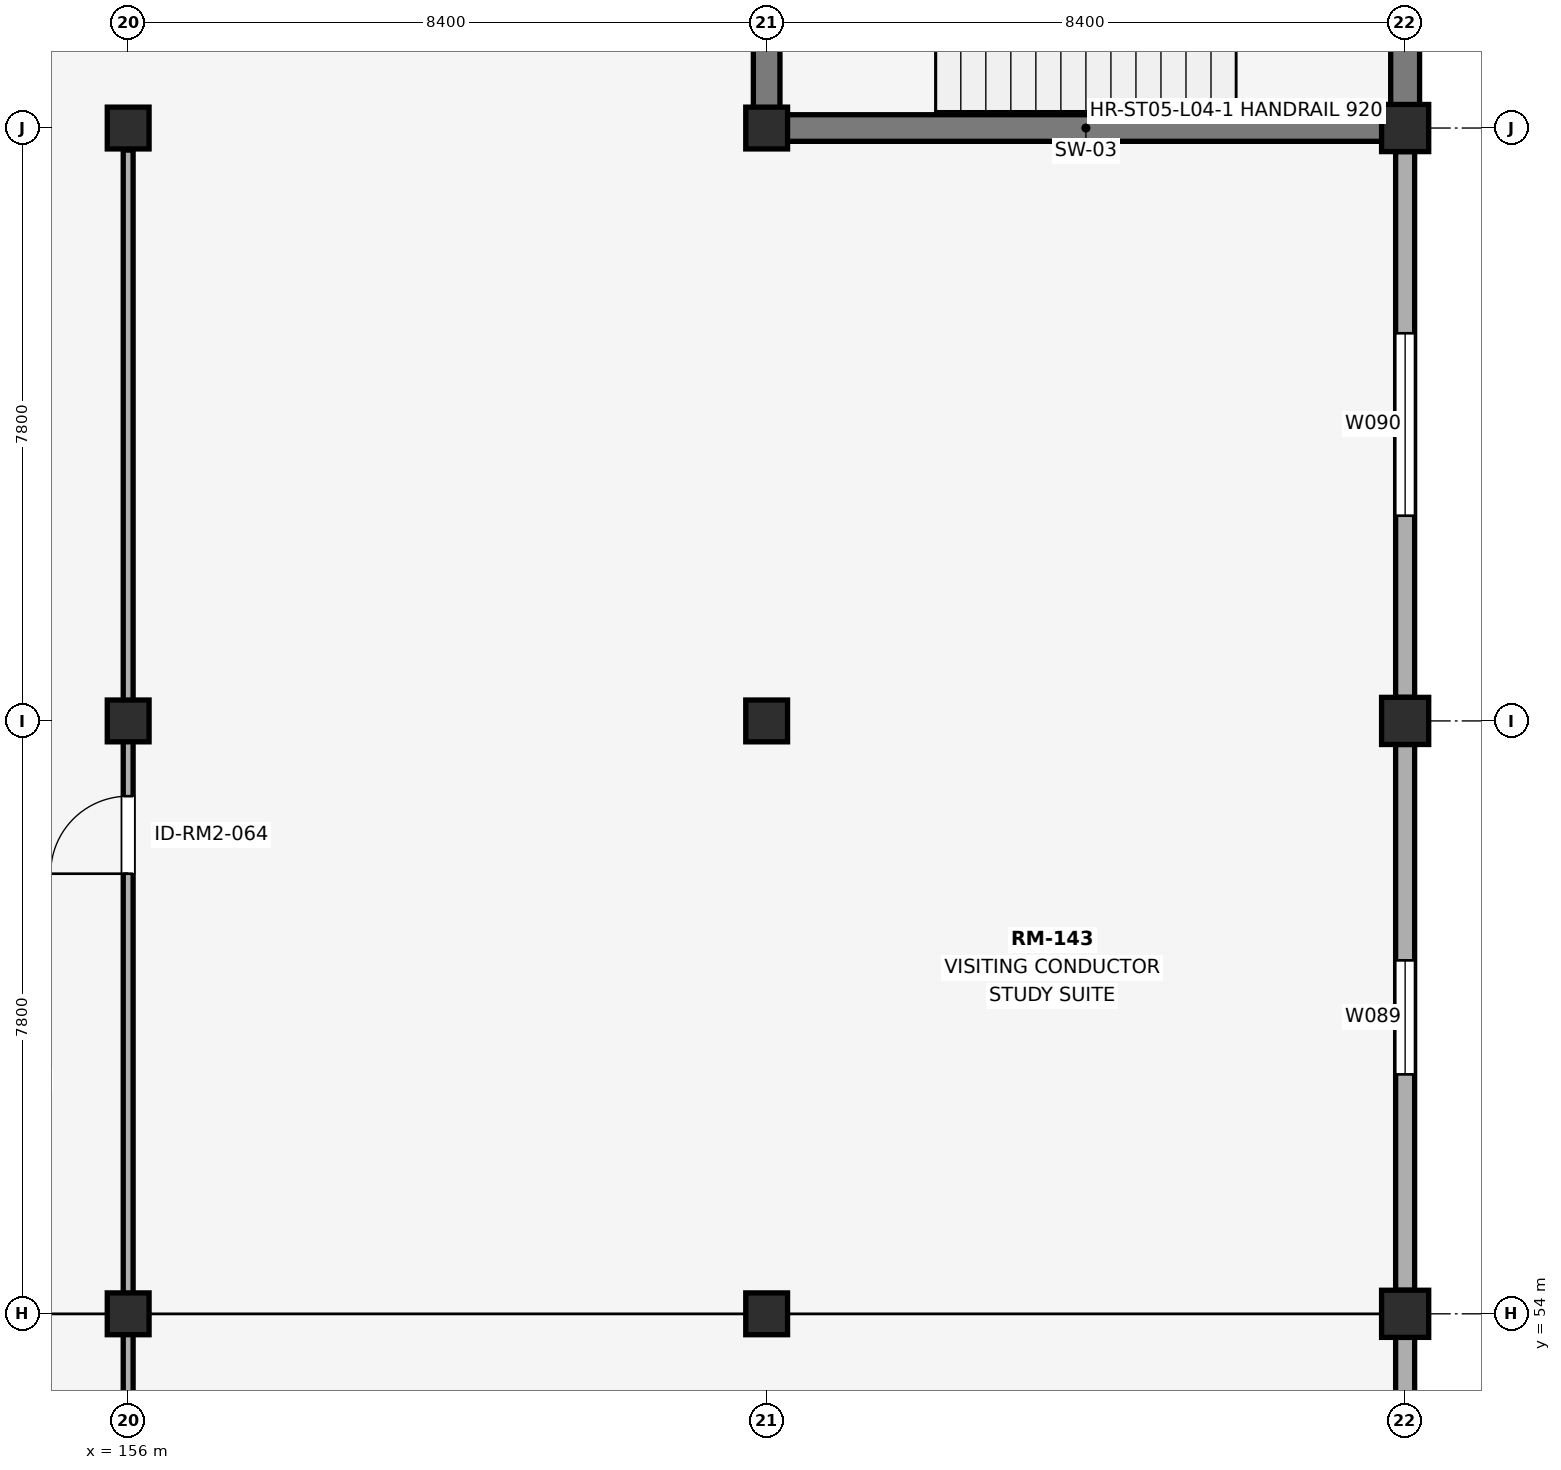
"""IFC4 building model, lengths in metres.
Left out: names, types, materials, properties, quantities, classifications, styles, units other than length and angle.
Written with IfcOpenShell. Run it as: python <this file> out.ifc"""

import sys

from ifc_helpers import new_model, si_unit, direction, frame, frame_2d, origin, origin_2d, place, context, subcontext, project, spatial, rectangle, extrude, element, fill, save


model = new_model("IFC4")
c1 = context("Model", 3, precision=1e-05, world=origin(), true_north=direction((0.0, 1.0)))
c2 = subcontext(c1, "Body", "Model", "MODEL_VIEW")
j1 = project(units=[si_unit("LENGTHUNIT", "METRE"), si_unit("PLANEANGLEUNIT", "RADIAN")], contexts=[c1])
p1 = place(None, origin())
s1 = spatial("IfcSite", under=j1, at=p1, CompositionType="ELEMENT")
p2 = place(p1, origin())
s2 = spatial("IfcBuilding", under=s1, at=p2, CompositionType="ELEMENT")
p3 = place(p2, frame((0.0, 0.0, 19.5)))
s3 = spatial("IfcBuildingStorey", under=s2, at=p3, CompositionType="ELEMENT", Elevation=19.5)
for number, where, z_axis, x_axis in (
    (1, (156.0, 54.0, 0.0), (0.0, 0.0, 1.0), (1.0, 0.0, 0.0)),
    (2, (156.0, 61.8, 0.0), (0.0, 0.0, 1.0), (1.0, 0.0, 0.0)),
    (3, (156.0, 69.6, 0.0), (0.0, 0.0, 1.0), (1.0, 0.0, 0.0)),
    (4, (164.4, 54.0, 0.0), (0.0, 0.0, 1.0), (1.0, 0.0, 0.0)),
    (5, (164.4, 61.8, 0.0), (0.0, 0.0, 1.0), (1.0, 0.0, 0.0)),
    (6, (164.4, 69.6, 0.0), (0.0, 0.0, 1.0), (1.0, 0.0, 0.0)),
):
    element("IfcColumn", number, at=place(p3, frame(where, z_axis=z_axis, x_axis=x_axis)), inside=s3, PredefinedType="COLUMN", context=c2, shape_type="SweptSolid", body=[
        extrude(rectangle(XDim=0.55, YDim=0.55, at=origin_2d()), origin(), (0.0, 0.0, 1.0), 4.5),
    ])
for number, where, z_axis, x_axis in (
    (7, (172.8, 54.0, 0.0), (0.0, 0.0, 1.0), (1.0, 0.0, 0.0)),
    (8, (172.8, 61.8, 0.0), (0.0, 0.0, 1.0), (1.0, 0.0, 0.0)),
    (9, (172.8, 69.6, 0.0), (0.0, 0.0, 1.0), (1.0, 0.0, 0.0)),
):
    element("IfcColumn", number, at=place(p3, frame(where, z_axis=z_axis, x_axis=x_axis)), inside=s3, PredefinedType="COLUMN", context=c2, shape_type="SweptSolid", body=[
        extrude(rectangle(XDim=0.62, YDim=0.62, at=origin_2d()), origin(), (0.0, 0.0, 1.0), 4.5),
    ])
p4 = place(p3, frame((164.225, 69.6, 0.0), z_axis=(0.0, 0.0, 1.0), x_axis=(1.0, 0.0, 0.0)))
e10 = element("IfcWall", 10, at=p4, inside=s3, PredefinedType="SHEAR", context=c2, shape_type="SweptSolid", body=[
    extrude(rectangle(XDim=8.75, YDim=0.35, at=frame_2d((4.375, 0.0))), origin(), (0.0, 0.0, 1.0), 4.5),
])
p5 = place(p3, frame((164.4, 69.775, 0.0), z_axis=(0.0, 0.0, 1.0), x_axis=(0.0, 1.0, 0.0)))
e11 = element("IfcWall", 11, at=p5, inside=s3, PredefinedType="SHEAR", context=c2, shape_type="SweptSolid", body=[
    extrude(rectangle(XDim=7.45, YDim=0.35, at=frame_2d((3.725, 0.0))), origin(), (0.0, 0.0, 1.0), 4.5),
])
p6 = place(p5, frame((2.1, 0.0, 0.0)))
e12 = element("IfcOpeningElement", 12, at=p6, cuts=e11, PredefinedType="OPENING", context=c2, shape_type="SweptSolid", body=[
    extrude(rectangle(XDim=1.1, YDim=2.2, at=frame_2d((0.55, 1.1))), frame((0.0, 0.185, 0.0), z_axis=(0.0, -1.0, 0.0), x_axis=(1.0, 0.0, 0.0)), (0.0, 0.0, 1.0), 0.37),
])
p7 = place(p3, frame((172.8, 69.775, 0.0), z_axis=(0.0, 0.0, 1.0), x_axis=(0.0, 1.0, 0.0)))
e13 = element("IfcWall", 13, at=p7, inside=s3, PredefinedType="SHEAR", context=c2, shape_type="SweptSolid", body=[
    extrude(rectangle(XDim=7.45, YDim=0.38, at=frame_2d((3.725, 0.0))), origin(), (0.0, 0.0, 1.0), 4.5),
])
p8 = place(p3, frame((172.8, 46.51, 0.0), z_axis=(0.0, 0.0, 1.0), x_axis=(0.0, 1.0, 0.0)))
e14 = element("IfcWall", 14, at=p8, inside=s3, PredefinedType="SOLIDWALL", context=c2, shape_type="SweptSolid", body=[
    extrude(rectangle(XDim=7.18, YDim=0.25, at=frame_2d((3.59, 0.0))), origin(), (0.0, 0.0, 1.0), 3.52),
])
p9 = place(p8, frame((2.99, 0.0, 0.9)))
e15 = element("IfcOpeningElement", 15, at=p9, cuts=e14, PredefinedType="OPENING", context=c2, shape_type="SweptSolid", body=[
    extrude(rectangle(XDim=1.2, YDim=1.65, at=frame_2d((0.6, 0.825))), frame((0.0, 0.135, 0.0), z_axis=(0.0, -1.0, 0.0), x_axis=(1.0, 0.0, 0.0)), (0.0, 0.0, 1.0), 0.27),
])
p10 = place(p3, frame((172.8, 54.31, 0.0), z_axis=(0.0, 0.0, 1.0), x_axis=(0.0, 1.0, 0.0)))
e16 = element("IfcWall", 16, at=p10, inside=s3, PredefinedType="SOLIDWALL", context=c2, shape_type="SweptSolid", body=[
    extrude(rectangle(XDim=7.18, YDim=0.25, at=frame_2d((3.59, 0.0))), origin(), (0.0, 0.0, 1.0), 3.52),
])
p11 = place(p10, frame((2.84, 0.0, 0.9)))
e17 = element("IfcOpeningElement", 17, at=p11, cuts=e16, PredefinedType="OPENING", context=c2, shape_type="SweptSolid", body=[
    extrude(rectangle(XDim=1.5, YDim=2.1, at=frame_2d((0.75, 1.05))), frame((0.0, 0.135, 0.0), z_axis=(0.0, -1.0, 0.0), x_axis=(1.0, 0.0, 0.0)), (0.0, 0.0, 1.0), 0.27),
])
p12 = place(p3, frame((172.8, 62.11, 0.0), z_axis=(0.0, 0.0, 1.0), x_axis=(0.0, 1.0, 0.0)))
e18 = element("IfcWall", 18, at=p12, inside=s3, PredefinedType="SOLIDWALL", context=c2, shape_type="SweptSolid", body=[
    extrude(rectangle(XDim=7.18, YDim=0.25, at=frame_2d((3.59, 0.0))), origin(), (0.0, 0.0, 1.0), 3.52),
])
p13 = place(p12, frame((2.39, 0.0, 0.9)))
e19 = element("IfcOpeningElement", 19, at=p13, cuts=e18, PredefinedType="OPENING", context=c2, shape_type="SweptSolid", body=[
    extrude(rectangle(XDim=2.4, YDim=2.1, at=frame_2d((1.2, 1.05))), frame((0.0, 0.135, 0.0), z_axis=(0.0, -1.0, 0.0), x_axis=(1.0, 0.0, 0.0)), (0.0, 0.0, 1.0), 0.27),
])
p14 = place(p3, frame((156.0, 30.29, 0.0), z_axis=(0.0, 0.0, 1.0), x_axis=(0.0, 1.0, 0.0)))
e20 = element("IfcWall", 20, at=p14, inside=s3, PredefinedType="PARTITIONING", context=c2, shape_type="SweptSolid", body=[
    extrude(rectangle(XDim=39.02, YDim=0.13, at=frame_2d((19.51, 0.0))), origin(), (0.0, 0.0, 1.0), 3.42),
])
p15 = place(p14, frame((2.4, 0.0, 0.0)))
e21 = element("IfcOpeningElement", 21, at=p15, cuts=e20, PredefinedType="OPENING", context=c2, shape_type="SweptSolid", body=[
    extrude(rectangle(XDim=0.92, YDim=2.15, at=frame_2d((0.46, 1.075))), frame((0.0, 0.075, 0.0), z_axis=(0.0, -1.0, 0.0), x_axis=(1.0, 0.0, 0.0)), (0.0, 0.0, 1.0), 0.15),
])
p16 = place(p14, frame((13.45, 0.0, 0.0)))
e22 = element("IfcOpeningElement", 22, at=p16, cuts=e20, PredefinedType="OPENING", context=c2, shape_type="SweptSolid", body=[
    extrude(rectangle(XDim=1.9, YDim=2.35, at=frame_2d((0.95, 1.175))), frame((0.0, 0.075, 0.0), z_axis=(0.0, -1.0, 0.0), x_axis=(1.0, 0.0, 0.0)), (0.0, 0.0, 1.0), 0.15),
])
p17 = place(p14, frame((29.5, 0.0, 0.0)))
e23 = element("IfcOpeningElement", 23, at=p17, cuts=e20, PredefinedType="OPENING", context=c2, shape_type="SweptSolid", body=[
    extrude(rectangle(XDim=1.02, YDim=2.18, at=frame_2d((0.51, 1.09))), frame((0.0, 0.075, 0.0), z_axis=(0.0, -1.0, 0.0), x_axis=(1.0, 0.0, 0.0)), (0.0, 0.0, 1.0), 0.15),
])
p18 = place(p11, origin())
e24 = element("IfcWindow", 24, at=p18, inside=s3, PartitioningType="SINGLE_PANEL", PredefinedType="WINDOW", context=c2, shape_type="SweptSolid", body=[
    extrude(rectangle(XDim=1.5, YDim=2.1, at=frame_2d((0.75, 1.05))), frame((0.0, 0.03, 0.0), z_axis=(0.0, -1.0, 0.0), x_axis=(1.0, 0.0, 0.0)), (0.0, 0.0, 1.0), 0.06),
])
fill(e17, e24)
p19 = place(p13, origin())
e25 = element("IfcWindow", 25, at=p19, inside=s3, PartitioningType="SINGLE_PANEL", PredefinedType="WINDOW", context=c2, shape_type="SweptSolid", body=[
    extrude(rectangle(XDim=2.4, YDim=2.1, at=frame_2d((1.2, 1.05))), frame((0.0, 0.03, 0.0), z_axis=(0.0, -1.0, 0.0), x_axis=(1.0, 0.0, 0.0)), (0.0, 0.0, 1.0), 0.06),
])
fill(e19, e25)
p20 = place(p17, origin())
e26 = element("IfcDoor", 26, at=p20, inside=s3, OperationType="SINGLE_SWING_LEFT", PredefinedType="DOOR", context=c2, shape_type="SweptSolid", body=[
    extrude(rectangle(XDim=1.02, YDim=2.18, at=frame_2d((0.51, 1.09))), frame((0.0, 0.025, 0.0), z_axis=(0.0, -1.0, 0.0), x_axis=(1.0, 0.0, 0.0)), (0.0, 0.0, 1.0), 0.05),
])
fill(e23, e26)
save(model, sys.argv[1])
